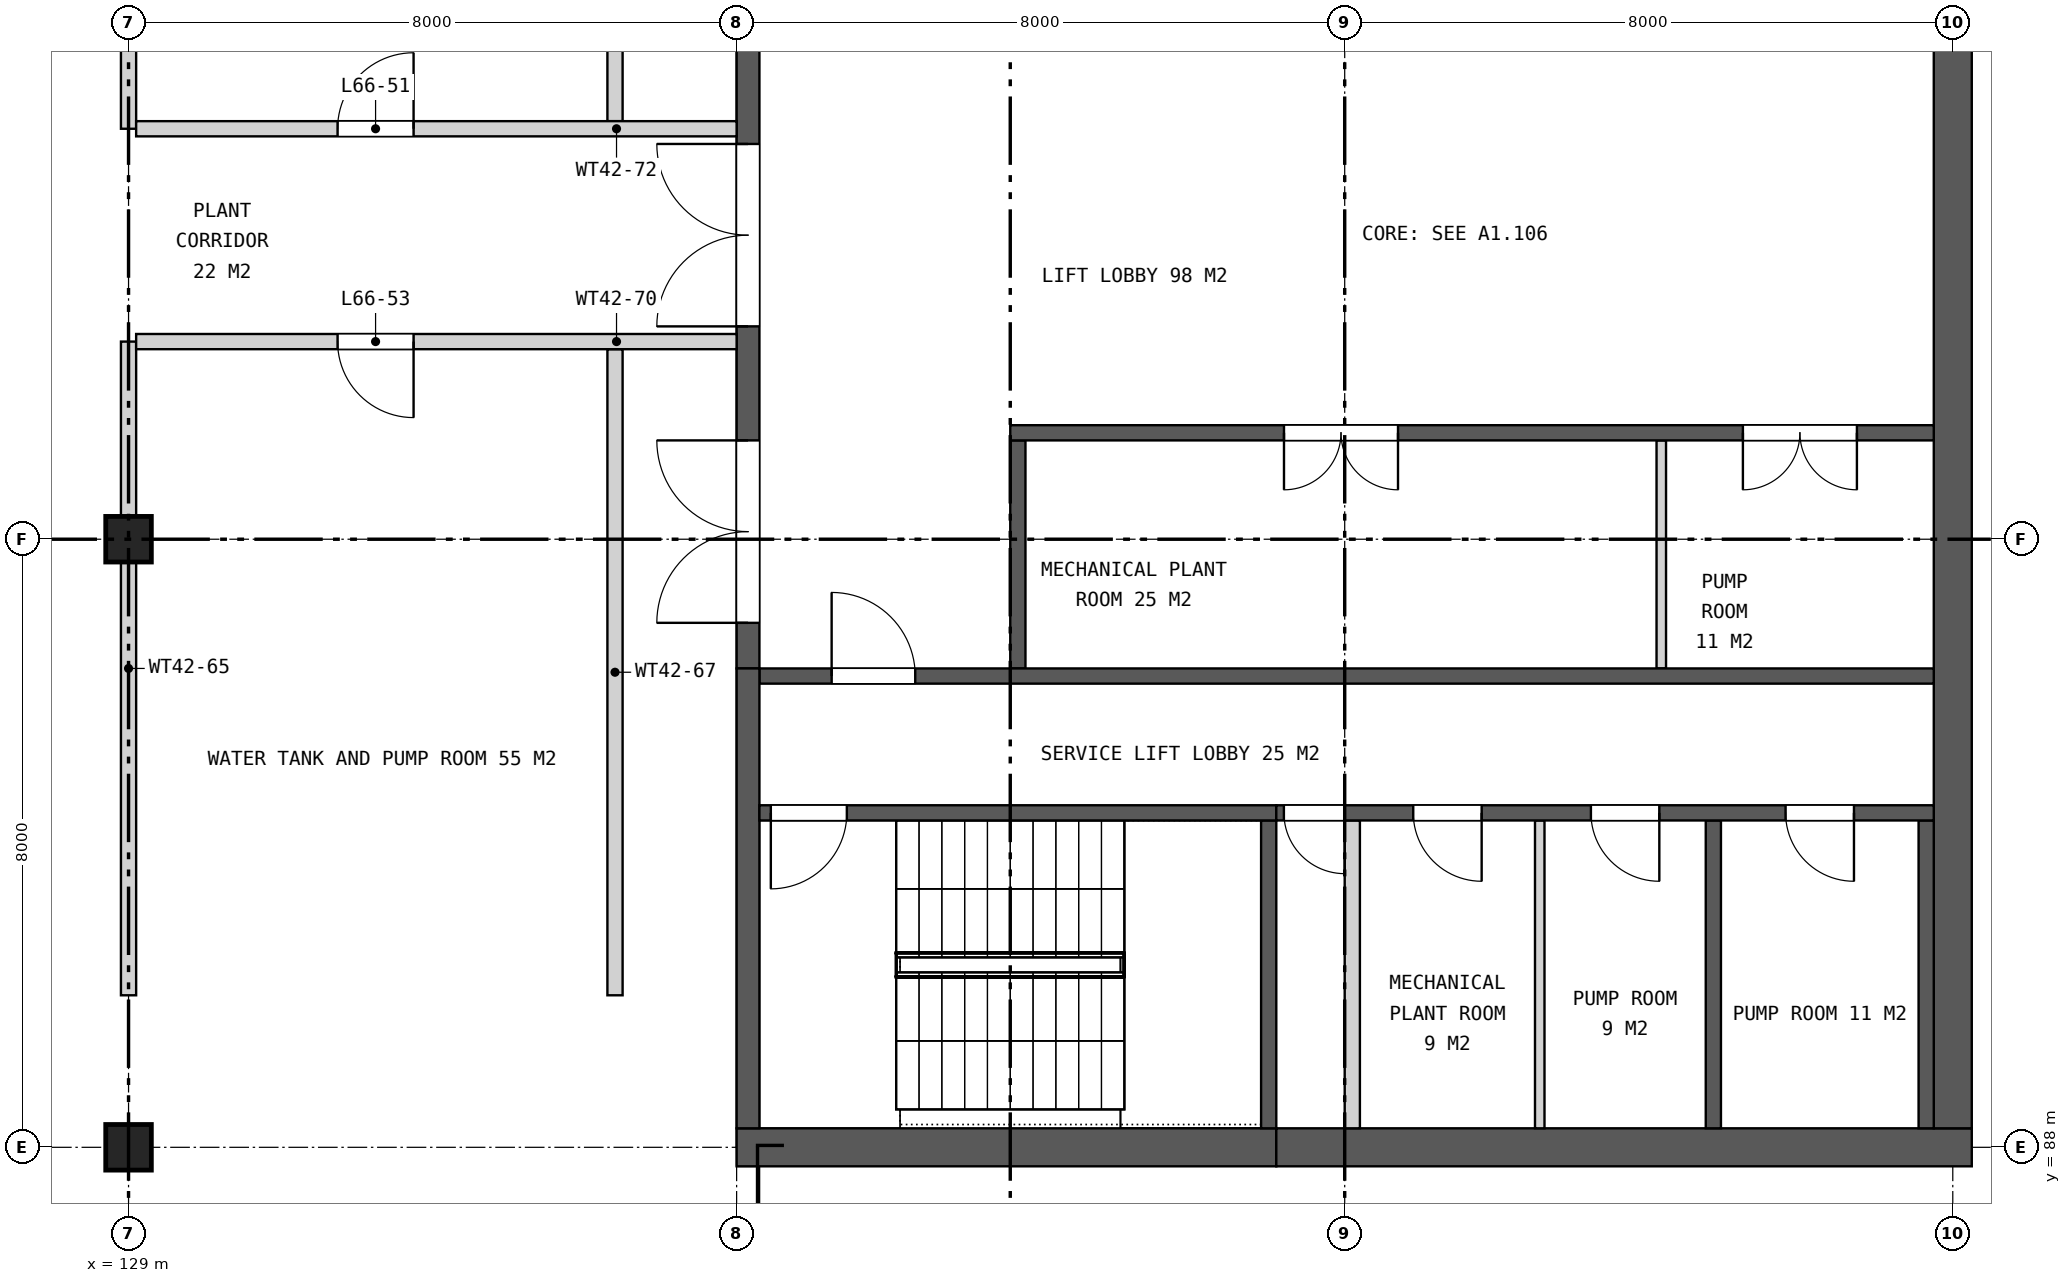
"""IFC4 building model, lengths in metres.
Left out: names, types, materials, properties, quantities, classifications, styles, units other than length and angle.
Written with IfcOpenShell. Run it as: python <this file> out.ifc"""

import sys

from ifc_helpers import new_model, si_unit, direction, frame, frame_2d, origin, origin_2d, place, context, subcontext, project, spatial, rectangle, extrude, element, fill, save


model = new_model("IFC4")
c1 = context("Model", 3, precision=1e-05, world=origin(), true_north=direction((0.0, 1.0)))
c2 = subcontext(c1, "Body", "Model", "MODEL_VIEW")
j1 = project(units=[si_unit("LENGTHUNIT", "METRE"), si_unit("PLANEANGLEUNIT", "RADIAN")], contexts=[c1])
p1 = place(None, origin())
s1 = spatial("IfcSite", under=j1, at=p1, CompositionType="ELEMENT")
p2 = place(p1, origin())
s2 = spatial("IfcBuilding", under=s1, at=p2, CompositionType="ELEMENT")
p3 = place(p2, frame((0.0, 0.0, 303.9)))
s3 = spatial("IfcBuildingStorey", under=s2, at=p3, CompositionType="ELEMENT", Elevation=303.9)
for number, where, z_axis, x_axis in (
    (1, (129.0, 88.0, 0.0), (0.0, 0.0, 1.0), (1.0, 0.0, 0.0)),
    (2, (129.0, 96.0, 0.0), (0.0, 0.0, 1.0), (1.0, 0.0, 0.0)),
):
    element("IfcColumn", number, at=place(p3, frame(where, z_axis=z_axis, x_axis=x_axis)), inside=s3, PredefinedType="COLUMN", context=c2, shape_type="SweptSolid", body=[
        extrude(rectangle(XDim=0.6, YDim=0.6, at=origin_2d()), origin(), (0.0, 0.0, 1.0), 7.4),
    ])
p4 = place(p3, frame((137.0, 88.0, 0.0), z_axis=(0.0, 0.0, 1.0), x_axis=(1.0, 0.0, 0.0)))
e3 = element("IfcWall", 3, at=p4, inside=s3, PredefinedType="SHEAR", context=c2, shape_type="SweptSolid", body=[
    extrude(rectangle(XDim=7.1, YDim=0.5, at=frame_2d((3.55, 0.0))), origin(), (0.0, 0.0, 1.0), 7.4),
])
p5 = place(p3, frame((144.1, 88.0, 0.0), z_axis=(0.0, 0.0, 1.0), x_axis=(1.0, 0.0, 0.0)))
e4 = element("IfcWall", 4, at=p5, inside=s3, PredefinedType="SHEAR", context=c2, shape_type="SweptSolid", body=[
    extrude(rectangle(XDim=9.15, YDim=0.5, at=frame_2d((4.575, 0.0))), origin(), (0.0, 0.0, 1.0), 7.4),
])
p6 = place(p3, frame((153.0, 88.25, 0.0), z_axis=(0.0, 0.0, 1.0), x_axis=(0.0, 1.0, 0.0)))
e5 = element("IfcWall", 5, at=p6, inside=s3, PredefinedType="SHEAR", context=c2, shape_type="SweptSolid", body=[
    extrude(rectangle(XDim=23.5, YDim=0.5, at=frame_2d((11.75, 0.0))), origin(), (0.0, 0.0, 1.0), 7.4),
])
p7 = place(p3, frame((137.15, 94.3, 0.0), z_axis=(0.0, 0.0, 1.0), x_axis=(0.0, 1.0, 0.0)))
e6 = element("IfcWall", 6, at=p7, inside=s3, PredefinedType="SHEAR", context=c2, shape_type="SweptSolid", body=[
    extrude(rectangle(XDim=11.4, YDim=0.3, at=frame_2d((5.7, 0.0))), origin(), (0.0, 0.0, 1.0), 7.4),
])
p8 = place(p7, frame((0.6, 0.0, 0.0)))
e7 = element("IfcOpeningElement", 7, at=p8, cuts=e6, PredefinedType="OPENING", context=c2, shape_type="SweptSolid", body=[
    extrude(rectangle(XDim=2.4, YDim=2.4, at=frame_2d((1.2, 1.2))), frame((0.0, 0.16, 0.0), z_axis=(0.0, -1.0, 0.0), x_axis=(1.0, 0.0, 0.0)), (0.0, 0.0, 1.0), 0.32),
])
p9 = place(p7, frame((4.5, 0.0, 0.0)))
e8 = element("IfcOpeningElement", 8, at=p9, cuts=e6, PredefinedType="OPENING", context=c2, shape_type="SweptSolid", body=[
    extrude(rectangle(XDim=2.4, YDim=2.4, at=frame_2d((1.2, 1.2))), frame((0.0, 0.16, 0.0), z_axis=(0.0, -1.0, 0.0), x_axis=(1.0, 0.0, 0.0)), (0.0, 0.0, 1.0), 0.32),
])
p10 = place(p7, frame((8.4, 0.0, 0.0)))
e9 = element("IfcOpeningElement", 9, at=p10, cuts=e6, PredefinedType="OPENING", context=c2, shape_type="SweptSolid", body=[
    extrude(rectangle(XDim=2.4, YDim=2.4, at=frame_2d((1.2, 1.2))), frame((0.0, 0.16, 0.0), z_axis=(0.0, -1.0, 0.0), x_axis=(1.0, 0.0, 0.0)), (0.0, 0.0, 1.0), 0.32),
])
p11 = place(p3, frame((140.7, 94.3, 0.0), z_axis=(0.0, 0.0, 1.0), x_axis=(0.0, 1.0, 0.0)))
e10 = element("IfcWall", 10, at=p11, inside=s3, PredefinedType="SHEAR", context=c2, shape_type="SweptSolid", body=[
    extrude(rectangle(XDim=3.0, YDim=0.2, at=frame_2d((1.5, 0.0))), origin(), (0.0, 0.0, 1.0), 7.4),
])
p12 = place(p3, frame((149.165, 94.3, 0.0), z_axis=(0.0, 0.0, 1.0), x_axis=(0.0, 1.0, 0.0)))
e11 = element("IfcWall", 11, at=p12, inside=s3, PredefinedType="PARTITIONING", context=c2, shape_type="SweptSolid", body=[
    extrude(rectangle(XDim=3.0, YDim=0.125, at=frame_2d((1.5, 0.0))), origin(), (0.0, 0.0, 1.0), 7.4),
])
p13 = place(p3, frame((140.6, 97.4, 0.0), z_axis=(0.0, 0.0, 1.0), x_axis=(1.0, 0.0, 0.0)))
e12 = element("IfcWall", 12, at=p13, inside=s3, PredefinedType="SHEAR", context=c2, shape_type="SweptSolid", body=[
    extrude(rectangle(XDim=12.15, YDim=0.2, at=frame_2d((6.075, 0.0))), origin(), (0.0, 0.0, 1.0), 7.4),
])
p14 = place(p13, frame((3.601, 0.0, 0.0)))
e13 = element("IfcOpeningElement", 13, at=p14, cuts=e12, PredefinedType="OPENING", context=c2, shape_type="SweptSolid", body=[
    extrude(rectangle(XDim=1.5, YDim=2.1, at=frame_2d((0.75, 1.05))), frame((0.0, 0.11, 0.0), z_axis=(0.0, -1.0, 0.0), x_axis=(1.0, 0.0, 0.0)), (0.0, 0.0, 1.0), 0.22),
])
p15 = place(p13, frame((9.639, 0.0, 0.0)))
e14 = element("IfcOpeningElement", 14, at=p15, cuts=e12, PredefinedType="OPENING", context=c2, shape_type="SweptSolid", body=[
    extrude(rectangle(XDim=1.5, YDim=2.1, at=frame_2d((0.75, 1.05))), frame((0.0, 0.11, 0.0), z_axis=(0.0, -1.0, 0.0), x_axis=(1.0, 0.0, 0.0)), (0.0, 0.0, 1.0), 0.22),
])
p16 = place(p3, frame((137.3, 94.2, 0.0), z_axis=(0.0, 0.0, 1.0), x_axis=(1.0, 0.0, 0.0)))
e15 = element("IfcWall", 15, at=p16, inside=s3, PredefinedType="SHEAR", context=c2, shape_type="SweptSolid", body=[
    extrude(rectangle(XDim=15.45, YDim=0.2, at=frame_2d((7.725, 0.0))), origin(), (0.0, 0.0, 1.0), 7.4),
])
p17 = place(p16, frame((0.95, 0.0, 0.0)))
e16 = element("IfcOpeningElement", 16, at=p17, cuts=e15, PredefinedType="OPENING", context=c2, shape_type="SweptSolid", body=[
    extrude(rectangle(XDim=1.1, YDim=2.1, at=frame_2d((0.55, 1.05))), frame((0.0, 0.11, 0.0), z_axis=(0.0, -1.0, 0.0), x_axis=(1.0, 0.0, 0.0)), (0.0, 0.0, 1.0), 0.22),
])
p18 = place(p3, frame((137.15, 88.25, 0.0), z_axis=(0.0, 0.0, 1.0), x_axis=(0.0, 1.0, 0.0)))
e17 = element("IfcWall", 17, at=p18, inside=s3, PredefinedType="SHEAR", context=c2, shape_type="SweptSolid", body=[
    extrude(rectangle(XDim=6.05, YDim=0.3, at=frame_2d((3.025, 0.0))), origin(), (0.0, 0.0, 1.0), 7.4),
])
for number, where, z_axis, x_axis in (
    (18, (144.0, 88.25, 0.0), (0.0, 0.0, 1.0), (0.0, 1.0, 0.0)),
    (19, (149.85, 88.25, 0.0), (0.0, 0.0, 1.0), (0.0, 1.0, 0.0)),
    (20, (152.65, 88.25, 0.0), (0.0, 0.0, 1.0), (0.0, 1.0, 0.0)),
):
    element("IfcWall", number, at=place(p3, frame(where, z_axis=z_axis, x_axis=x_axis)), inside=s3, PredefinedType="SHEAR", context=c2, shape_type="SweptSolid", body=[
        extrude(rectangle(XDim=4.05, YDim=0.2, at=frame_2d((2.025, 0.0))), origin(), (0.0, 0.0, 1.0), 7.4),
    ])
p19 = place(p3, frame((145.1, 88.25, 0.0), z_axis=(0.0, 0.0, 1.0), x_axis=(0.0, 1.0, 0.0)))
e21 = element("IfcWall", 21, at=p19, inside=s3, PredefinedType="PARTITIONING", context=c2, shape_type="SweptSolid", body=[
    extrude(rectangle(XDim=4.05, YDim=0.2, at=frame_2d((2.025, 0.0))), origin(), (0.0, 0.0, 1.0), 7.4),
])
p20 = place(p3, frame((147.566, 88.25, 0.0), z_axis=(0.0, 0.0, 1.0), x_axis=(0.0, 1.0, 0.0)))
e22 = element("IfcWall", 22, at=p20, inside=s3, PredefinedType="PARTITIONING", context=c2, shape_type="SweptSolid", body=[
    extrude(rectangle(XDim=4.05, YDim=0.125, at=frame_2d((2.025, 0.0))), origin(), (0.0, 0.0, 1.0), 7.4),
])
p21 = place(p3, frame((137.3, 92.4, 0.0), z_axis=(0.0, 0.0, 1.0), x_axis=(1.0, 0.0, 0.0)))
e23 = element("IfcWall", 23, at=p21, inside=s3, PredefinedType="SHEAR", context=c2, shape_type="SweptSolid", body=[
    extrude(rectangle(XDim=6.8, YDim=0.2, at=frame_2d((3.4, 0.0))), origin(), (0.0, 0.0, 1.0), 7.4),
])
p22 = place(p21, frame((0.15, 0.0, 0.0)))
e24 = element("IfcOpeningElement", 24, at=p22, cuts=e23, PredefinedType="OPENING", context=c2, shape_type="SweptSolid", body=[
    extrude(rectangle(XDim=1.0, YDim=2.1, at=frame_2d((0.5, 1.05))), frame((0.0, 0.11, 0.0), z_axis=(0.0, -1.0, 0.0), x_axis=(1.0, 0.0, 0.0)), (0.0, 0.0, 1.0), 0.22),
])
p23 = place(p3, frame((144.1, 92.4, 0.0), z_axis=(0.0, 0.0, 1.0), x_axis=(1.0, 0.0, 0.0)))
e25 = element("IfcWall", 25, at=p23, inside=s3, PredefinedType="SHEAR", context=c2, shape_type="SweptSolid", body=[
    extrude(rectangle(XDim=8.65, YDim=0.2, at=frame_2d((4.325, 0.0))), origin(), (0.0, 0.0, 1.0), 7.4),
])
p24 = place(p23, frame((0.1, 0.0, 0.0)))
e26 = element("IfcOpeningElement", 26, at=p24, cuts=e25, PredefinedType="OPENING", context=c2, shape_type="SweptSolid", body=[
    extrude(rectangle(XDim=0.8, YDim=2.1, at=frame_2d((0.4, 1.05))), frame((0.0, 0.11, 0.0), z_axis=(0.0, -1.0, 0.0), x_axis=(1.0, 0.0, 0.0)), (0.0, 0.0, 1.0), 0.22),
])
p25 = place(p23, frame((1.802, 0.0, 0.0)))
e27 = element("IfcOpeningElement", 27, at=p25, cuts=e25, PredefinedType="OPENING", context=c2, shape_type="SweptSolid", body=[
    extrude(rectangle(XDim=0.9, YDim=2.1, at=frame_2d((0.45, 1.05))), frame((0.0, 0.11, 0.0), z_axis=(0.0, -1.0, 0.0), x_axis=(1.0, 0.0, 0.0)), (0.0, 0.0, 1.0), 0.22),
])
p26 = place(p23, frame((4.139, 0.0, 0.0)))
e28 = element("IfcOpeningElement", 28, at=p26, cuts=e25, PredefinedType="OPENING", context=c2, shape_type="SweptSolid", body=[
    extrude(rectangle(XDim=0.9, YDim=2.1, at=frame_2d((0.45, 1.05))), frame((0.0, 0.11, 0.0), z_axis=(0.0, -1.0, 0.0), x_axis=(1.0, 0.0, 0.0)), (0.0, 0.0, 1.0), 0.22),
])
p27 = place(p23, frame((6.7, 0.0, 0.0)))
e29 = element("IfcOpeningElement", 29, at=p27, cuts=e25, PredefinedType="OPENING", context=c2, shape_type="SweptSolid", body=[
    extrude(rectangle(XDim=0.9, YDim=2.1, at=frame_2d((0.45, 1.05))), frame((0.0, 0.11, 0.0), z_axis=(0.0, -1.0, 0.0), x_axis=(1.0, 0.0, 0.0)), (0.0, 0.0, 1.0), 0.22),
])
for number, where, z_axis, x_axis in (
    (30, (129.0, 90.0, 0.0), (0.0, 0.0, 1.0), (0.0, 1.0, 0.0)),
    (31, (129.0, 101.4, 0.0), (0.0, 0.0, 1.0), (0.0, 1.0, 0.0)),
):
    element("IfcWall", number, at=place(p3, frame(where, z_axis=z_axis, x_axis=x_axis)), inside=s3, PredefinedType="SOLIDWALL", context=c2, shape_type="SweptSolid", body=[
        extrude(rectangle(XDim=8.6, YDim=0.2, at=frame_2d((4.3, 0.0))), origin(), (0.0, 0.0, 1.0), 6.643),
    ])
for number, where, z_axis, x_axis in (
    (32, (135.4, 90.0, 0.0), (0.0, 0.0, 1.0), (0.0, 1.0, 0.0)),
    (33, (135.4, 101.5, 0.0), (0.0, 0.0, 1.0), (0.0, 1.0, 0.0)),
):
    element("IfcWall", number, at=place(p3, frame(where, z_axis=z_axis, x_axis=x_axis)), inside=s3, PredefinedType="SOLIDWALL", context=c2, shape_type="SweptSolid", body=[
        extrude(rectangle(XDim=8.5, YDim=0.2, at=frame_2d((4.25, 0.0))), origin(), (0.0, 0.0, 1.0), 6.643),
    ])
p28 = place(p3, frame((129.1, 98.6, 0.0), z_axis=(0.0, 0.0, 1.0), x_axis=(1.0, 0.0, 0.0)))
e34 = element("IfcWall", 34, at=p28, inside=s3, PredefinedType="SOLIDWALL", context=c2, shape_type="SweptSolid", body=[
    extrude(rectangle(XDim=7.9, YDim=0.2, at=frame_2d((3.95, 0.0))), origin(), (0.0, 0.0, 1.0), 6.643),
])
p29 = place(p28, frame((2.65, 0.0, 0.0)))
e35 = element("IfcOpeningElement", 35, at=p29, cuts=e34, PredefinedType="OPENING", context=c2, shape_type="SweptSolid", body=[
    extrude(rectangle(XDim=1.0, YDim=2.1, at=frame_2d((0.5, 1.05))), frame((0.0, 0.11, 0.0), z_axis=(0.0, -1.0, 0.0), x_axis=(1.0, 0.0, 0.0)), (0.0, 0.0, 1.0), 0.22),
])
p30 = place(p3, frame((129.1, 101.4, 0.0), z_axis=(0.0, 0.0, 1.0), x_axis=(1.0, 0.0, 0.0)))
e36 = element("IfcWall", 36, at=p30, inside=s3, PredefinedType="SOLIDWALL", context=c2, shape_type="SweptSolid", body=[
    extrude(rectangle(XDim=7.9, YDim=0.2, at=frame_2d((3.95, 0.0))), origin(), (0.0, 0.0, 1.0), 6.643),
])
p31 = place(p30, frame((2.65, 0.0, 0.0)))
e37 = element("IfcOpeningElement", 37, at=p31, cuts=e36, PredefinedType="OPENING", context=c2, shape_type="SweptSolid", body=[
    extrude(rectangle(XDim=1.0, YDim=2.1, at=frame_2d((0.5, 1.05))), frame((0.0, 0.11, 0.0), z_axis=(0.0, -1.0, 0.0), x_axis=(1.0, 0.0, 0.0)), (0.0, 0.0, 1.0), 0.22),
])
p32 = place(p8, origin())
e38 = element("IfcDoor", 38, at=p32, inside=s3, OperationType="DOUBLE_DOOR_SINGLE_SWING", PredefinedType="DOOR", context=c2, shape_type="SweptSolid", body=[
    extrude(rectangle(XDim=2.4, YDim=2.4, at=frame_2d((1.2, 1.2))), frame((0.0, 0.025, 0.0), z_axis=(0.0, -1.0, 0.0), x_axis=(1.0, 0.0, 0.0)), (0.0, 0.0, 1.0), 0.05),
])
fill(e7, e38)
p33 = place(p9, origin())
e39 = element("IfcDoor", 39, at=p33, inside=s3, OperationType="DOUBLE_DOOR_SINGLE_SWING", PredefinedType="DOOR", context=c2, shape_type="SweptSolid", body=[
    extrude(rectangle(XDim=2.4, YDim=2.4, at=frame_2d((1.2, 1.2))), frame((0.0, 0.025, 0.0), z_axis=(0.0, -1.0, 0.0), x_axis=(1.0, 0.0, 0.0)), (0.0, 0.0, 1.0), 0.05),
])
fill(e8, e39)
p34 = place(p14, frame((1.5, 0.0, 0.0), z_axis=(0.0, 0.0, 1.0), x_axis=(-1.0, 0.0, 0.0)))
e40 = element("IfcDoor", 40, at=p34, inside=s3, OperationType="DOUBLE_DOOR_SINGLE_SWING", PredefinedType="DOOR", context=c2, shape_type="SweptSolid", body=[
    extrude(rectangle(XDim=1.5, YDim=2.1, at=frame_2d((0.75, 1.05))), frame((0.0, 0.025, 0.0), z_axis=(0.0, -1.0, 0.0), x_axis=(1.0, 0.0, 0.0)), (0.0, 0.0, 1.0), 0.05),
])
fill(e13, e40)
p35 = place(p15, frame((1.5, 0.0, 0.0), z_axis=(0.0, 0.0, 1.0), x_axis=(-1.0, 0.0, 0.0)))
e41 = element("IfcDoor", 41, at=p35, inside=s3, OperationType="DOUBLE_DOOR_SINGLE_SWING", PredefinedType="DOOR", context=c2, shape_type="SweptSolid", body=[
    extrude(rectangle(XDim=1.5, YDim=2.1, at=frame_2d((0.75, 1.05))), frame((0.0, 0.025, 0.0), z_axis=(0.0, -1.0, 0.0), x_axis=(1.0, 0.0, 0.0)), (0.0, 0.0, 1.0), 0.05),
])
fill(e14, e41)
p36 = place(p17, origin())
e42 = element("IfcDoor", 42, at=p36, inside=s3, OperationType="SINGLE_SWING_LEFT", PredefinedType="DOOR", context=c2, shape_type="SweptSolid", body=[
    extrude(rectangle(XDim=1.1, YDim=2.1, at=frame_2d((0.55, 1.05))), frame((0.0, 0.025, 0.0), z_axis=(0.0, -1.0, 0.0), x_axis=(1.0, 0.0, 0.0)), (0.0, 0.0, 1.0), 0.05),
])
fill(e16, e42)
p37 = place(p22, frame((1.0, 0.0, 0.0), z_axis=(0.0, 0.0, 1.0), x_axis=(-1.0, 0.0, 0.0)))
e43 = element("IfcDoor", 43, at=p37, inside=s3, OperationType="SINGLE_SWING_RIGHT", PredefinedType="DOOR", context=c2, shape_type="SweptSolid", body=[
    extrude(rectangle(XDim=1.0, YDim=2.1, at=frame_2d((0.5, 1.05))), frame((0.0, 0.025, 0.0), z_axis=(0.0, -1.0, 0.0), x_axis=(1.0, 0.0, 0.0)), (0.0, 0.0, 1.0), 0.05),
])
fill(e24, e43)
p38 = place(p24, frame((0.8, 0.0, 0.0), z_axis=(0.0, 0.0, 1.0), x_axis=(-1.0, 0.0, 0.0)))
e44 = element("IfcDoor", 44, at=p38, inside=s3, OperationType="SINGLE_SWING_LEFT", PredefinedType="DOOR", context=c2, shape_type="SweptSolid", body=[
    extrude(rectangle(XDim=0.8, YDim=2.1, at=frame_2d((0.4, 1.05))), frame((0.0, 0.025, 0.0), z_axis=(0.0, -1.0, 0.0), x_axis=(1.0, 0.0, 0.0)), (0.0, 0.0, 1.0), 0.05),
])
fill(e26, e44)
p39 = place(p25, frame((0.9, 0.0, 0.0), z_axis=(0.0, 0.0, 1.0), x_axis=(-1.0, 0.0, 0.0)))
e45 = element("IfcDoor", 45, at=p39, inside=s3, OperationType="SINGLE_SWING_LEFT", PredefinedType="DOOR", context=c2, shape_type="SweptSolid", body=[
    extrude(rectangle(XDim=0.9, YDim=2.1, at=frame_2d((0.45, 1.05))), frame((0.0, 0.025, 0.0), z_axis=(0.0, -1.0, 0.0), x_axis=(1.0, 0.0, 0.0)), (0.0, 0.0, 1.0), 0.05),
])
fill(e27, e45)
p40 = place(p26, frame((0.9, 0.0, 0.0), z_axis=(0.0, 0.0, 1.0), x_axis=(-1.0, 0.0, 0.0)))
e46 = element("IfcDoor", 46, at=p40, inside=s3, OperationType="SINGLE_SWING_LEFT", PredefinedType="DOOR", context=c2, shape_type="SweptSolid", body=[
    extrude(rectangle(XDim=0.9, YDim=2.1, at=frame_2d((0.45, 1.05))), frame((0.0, 0.025, 0.0), z_axis=(0.0, -1.0, 0.0), x_axis=(1.0, 0.0, 0.0)), (0.0, 0.0, 1.0), 0.05),
])
fill(e28, e46)
p41 = place(p27, frame((0.9, 0.0, 0.0), z_axis=(0.0, 0.0, 1.0), x_axis=(-1.0, 0.0, 0.0)))
e47 = element("IfcDoor", 47, at=p41, inside=s3, OperationType="SINGLE_SWING_LEFT", PredefinedType="DOOR", context=c2, shape_type="SweptSolid", body=[
    extrude(rectangle(XDim=0.9, YDim=2.1, at=frame_2d((0.45, 1.05))), frame((0.0, 0.025, 0.0), z_axis=(0.0, -1.0, 0.0), x_axis=(1.0, 0.0, 0.0)), (0.0, 0.0, 1.0), 0.05),
])
fill(e29, e47)
p42 = place(p31, origin())
e48 = element("IfcDoor", 48, at=p42, inside=s3, OperationType="SINGLE_SWING_RIGHT", PredefinedType="DOOR", context=c2, shape_type="SweptSolid", body=[
    extrude(rectangle(XDim=1.0, YDim=2.1, at=frame_2d((0.5, 1.05))), frame((0.0, 0.025, 0.0), z_axis=(0.0, -1.0, 0.0), x_axis=(1.0, 0.0, 0.0)), (0.0, 0.0, 1.0), 0.05),
])
fill(e37, e48)
p43 = place(p29, frame((1.0, 0.0, 0.0), z_axis=(0.0, 0.0, 1.0), x_axis=(-1.0, 0.0, 0.0)))
e49 = element("IfcDoor", 49, at=p43, inside=s3, OperationType="SINGLE_SWING_LEFT", PredefinedType="DOOR", context=c2, shape_type="SweptSolid", body=[
    extrude(rectangle(XDim=1.0, YDim=2.1, at=frame_2d((0.5, 1.05))), frame((0.0, 0.025, 0.0), z_axis=(0.0, -1.0, 0.0), x_axis=(1.0, 0.0, 0.0)), (0.0, 0.0, 1.0), 0.05),
])
fill(e35, e49)
save(model, sys.argv[1])
